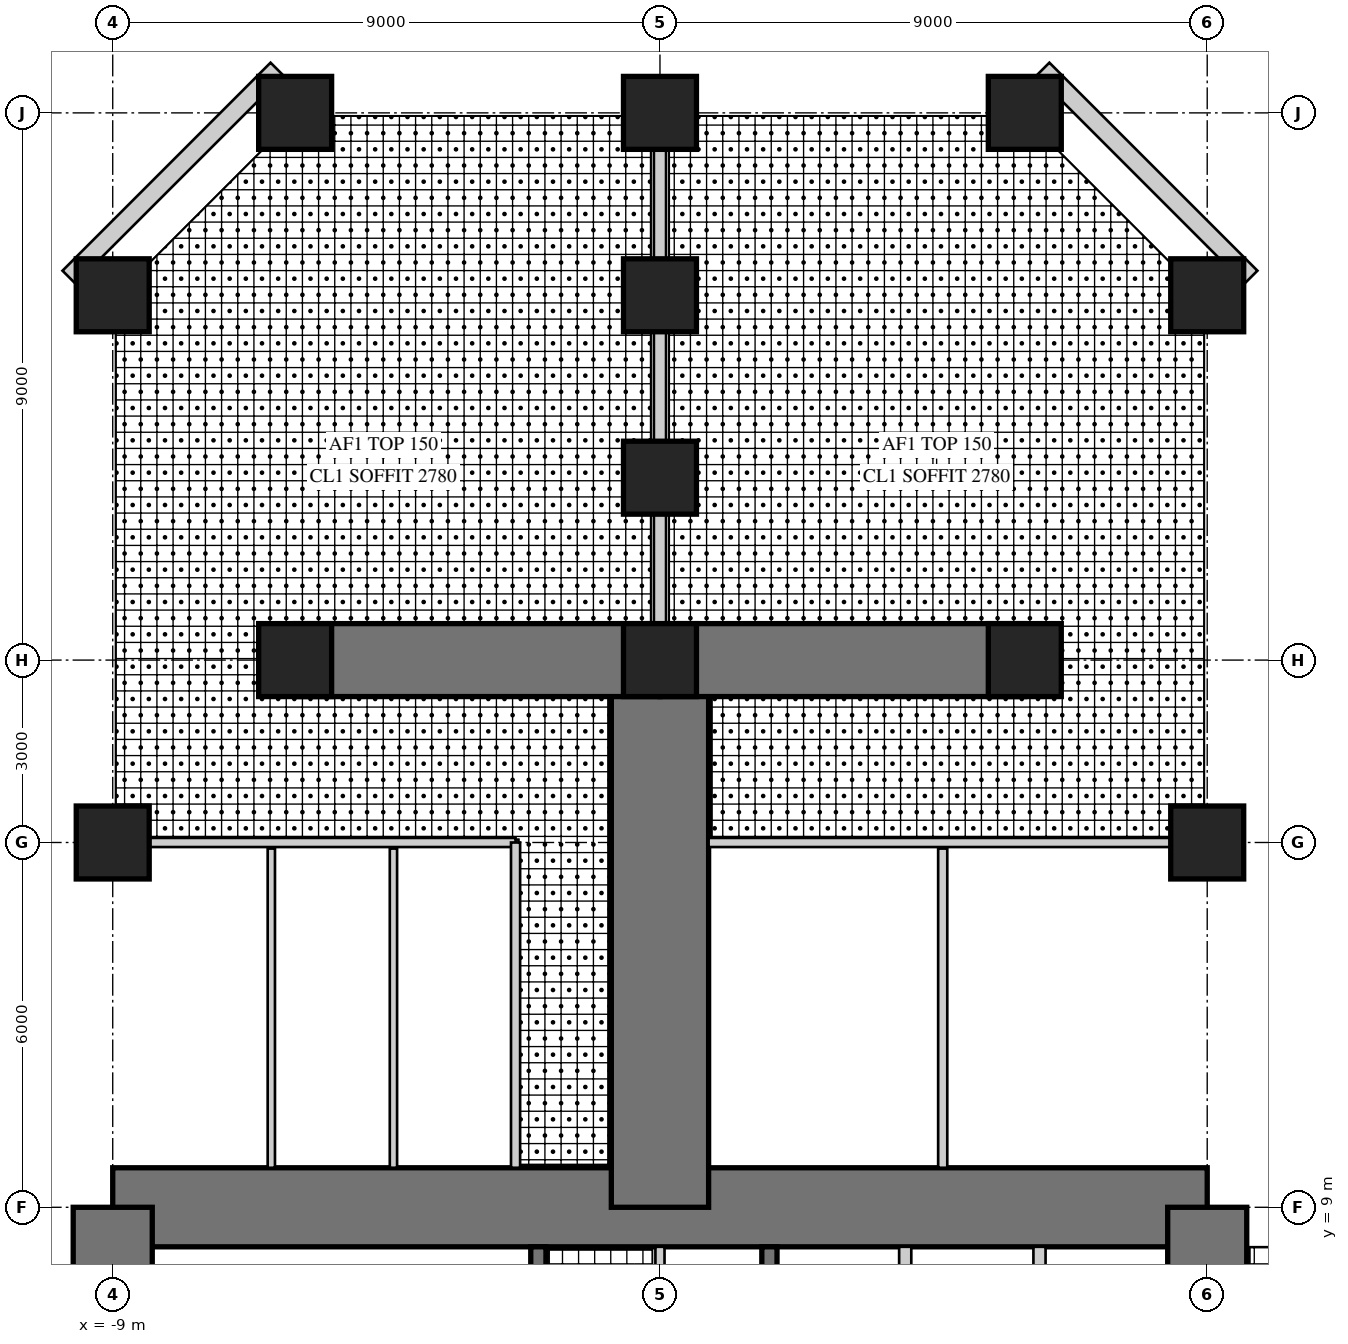
"""IFC4 building model, lengths in metres.
Left out: names, types, materials, properties, quantities, classifications, styles, units other than length and angle.
Written with IfcOpenShell. Run it as: python <this file> out.ifc"""

import sys

from ifc_helpers import new_model, si_unit, direction, frame, frame_2d, origin, origin_2d, place, context, subcontext, project, spatial, rectangle, hollow_rectangle, extrude, element, fill, save


model = new_model("IFC4")
c1 = context("Model", 3, precision=1e-05, world=origin(), true_north=direction((0.0, 1.0)))
c2 = subcontext(c1, "Body", "Model", "MODEL_VIEW")
j1 = project(units=[si_unit("LENGTHUNIT", "METRE"), si_unit("PLANEANGLEUNIT", "RADIAN")], contexts=[c1])
p1 = place(None, origin())
s1 = spatial("IfcSite", under=j1, at=p1, CompositionType="ELEMENT")
p2 = place(p1, origin())
s2 = spatial("IfcBuilding", under=s1, at=p2, CompositionType="ELEMENT")
p3 = place(p2, frame((0.0, 0.0, 27.5)))
s3 = spatial("IfcBuildingStorey", under=s2, at=p3, CompositionType="ELEMENT", Elevation=27.5)
p4 = place(p3, frame((9.0, 9.0, 0.0), z_axis=(0.0, 0.0, 1.0), x_axis=(-1.0, 0.0, 0.0)))
e1 = element("IfcWall", 1, at=p4, inside=s3, PredefinedType="SHEAR", context=c2, shape_type="SweptSolid", body=[
    extrude(rectangle(XDim=18.0, YDim=1.3, at=frame_2d((9.0, 0.0))), origin(), (0.0, 0.0, 1.0), 4.0),
])
p5 = place(p4, frame((9.8, 0.0, 0.0)))
e2 = element("IfcOpeningElement", 2, at=p5, cuts=e1, PredefinedType="OPENING", context=c2, shape_type="SweptSolid", body=[
    extrude(rectangle(XDim=1.0, YDim=2.4, at=frame_2d((0.5, 1.2))), frame((0.0, 0.66, 0.0), z_axis=(0.0, -1.0, 0.0), x_axis=(1.0, 0.0, 0.0)), (0.0, 0.0, 1.0), 1.32),
])
p6 = place(p3, frame((9.0, -9.0, 0.0), z_axis=(0.0, 0.0, 1.0), x_axis=(0.0, 1.0, 0.0)))
e3 = element("IfcWall", 3, at=p6, inside=s3, PredefinedType="SHEAR", context=c2, shape_type="SweptSolid", body=[
    extrude(rectangle(XDim=18.0, YDim=1.3, at=frame_2d((9.0, 0.0))), origin(), (0.0, 0.0, 1.0), 4.0),
])
p7 = place(p6, frame((9.8, 0.0, 0.0)))
e4 = element("IfcOpeningElement", 4, at=p7, cuts=e3, PredefinedType="OPENING", context=c2, shape_type="SweptSolid", body=[
    extrude(rectangle(XDim=1.0, YDim=2.4, at=frame_2d((0.5, 1.2))), frame((0.0, 0.66, 0.0), z_axis=(0.0, -1.0, 0.0), x_axis=(1.0, 0.0, 0.0)), (0.0, 0.0, 1.0), 1.32),
])
p8 = place(p3, frame((-9.0, 9.0, 0.0), z_axis=(0.0, 0.0, 1.0), x_axis=(0.0, -1.0, 0.0)))
e5 = element("IfcWall", 5, at=p8, inside=s3, PredefinedType="SHEAR", context=c2, shape_type="SweptSolid", body=[
    extrude(rectangle(XDim=18.0, YDim=1.3, at=frame_2d((9.0, 0.0))), origin(), (0.0, 0.0, 1.0), 4.0),
])
p9 = place(p8, frame((9.8, 0.0, 0.0)))
e6 = element("IfcOpeningElement", 6, at=p9, cuts=e5, PredefinedType="OPENING", context=c2, shape_type="SweptSolid", body=[
    extrude(rectangle(XDim=1.0, YDim=2.4, at=frame_2d((0.5, 1.2))), frame((0.0, 0.66, 0.0), z_axis=(0.0, -1.0, 0.0), x_axis=(1.0, 0.0, 0.0)), (0.0, 0.0, 1.0), 1.32),
])
p10 = place(p3, frame((1.8, 1.875, 0.0), z_axis=(0.0, 0.0, 1.0), x_axis=(0.0, 1.0, 0.0)))
e7 = element("IfcWall", 7, at=p10, inside=s3, PredefinedType="SHEAR", context=c2, shape_type="SweptSolid", body=[
    extrude(rectangle(XDim=6.475, YDim=0.25, at=frame_2d((3.238, 0.0))), origin(), (0.0, 0.0, 1.0), 4.0),
])
p11 = place(p10, frame((1.875, 0.0, 0.0)))
e8 = element("IfcOpeningElement", 8, at=p11, cuts=e7, PredefinedType="OPENING", context=c2, shape_type="SweptSolid", body=[
    extrude(rectangle(XDim=1.6, YDim=2.4, at=frame_2d((0.8, 1.2))), frame((0.0, 0.135, 0.0), z_axis=(0.0, -1.0, 0.0), x_axis=(1.0, 0.0, 0.0)), (0.0, 0.0, 1.0), 0.27),
])
for number, where, z_axis, x_axis in (
    (9, (4.033, 5.975, 0.0), (0.0, 0.0, 1.0), (0.0, 1.0, 0.0)),
    (10, (6.242, 5.975, 0.0), (0.0, 0.0, 1.0), (0.0, 1.0, 0.0)),
):
    element("IfcWall", number, at=place(p3, frame(where, z_axis=z_axis, x_axis=x_axis)), inside=s3, PredefinedType="PARTITIONING", context=c2, shape_type="SweptSolid", body=[
        extrude(rectangle(XDim=2.375, YDim=0.2, at=frame_2d((1.188, 0.0))), origin(), (0.0, 0.0, 1.0), 4.0),
    ])
p12 = place(p3, frame((-2.0, 1.675, 0.0), z_axis=(0.0, 0.0, 1.0), x_axis=(0.0, 1.0, 0.0)))
e11 = element("IfcWall", 11, at=p12, inside=s3, PredefinedType="SHEAR", context=c2, shape_type="SweptSolid", body=[
    extrude(rectangle(XDim=6.675, YDim=0.25, at=frame_2d((3.337, 0.0))), origin(), (0.0, 0.0, 1.0), 4.0),
])
p13 = place(p12, frame((0.725, 0.0, 0.0)))
e12 = element("IfcOpeningElement", 12, at=p13, cuts=e11, PredefinedType="OPENING", context=c2, shape_type="SweptSolid", body=[
    extrude(rectangle(XDim=1.0, YDim=2.1, at=frame_2d((0.5, 1.05))), frame((0.0, 0.135, 0.0), z_axis=(0.0, -1.0, 0.0), x_axis=(1.0, 0.0, 0.0)), (0.0, 0.0, 1.0), 0.27),
])
p14 = place(p3, frame((0.0, 9.0, 0.0), z_axis=(0.0, 0.0, 1.0), x_axis=(0.0, 1.0, 0.0)))
e13 = element("IfcWall", 13, at=p14, inside=s3, PredefinedType="SHEAR", context=c2, shape_type="SweptSolid", body=[
    extrude(rectangle(XDim=9.0, YDim=1.6, at=frame_2d((4.5, 0.0))), origin(), (0.0, 0.0, 1.0), 4.0),
])
for number, where, z_axis, x_axis in (
    (14, (0.0, 18.0, 0.0), (0.0, 0.0, 1.0), (-1.0, 0.0, 0.0)),
    (15, (0.0, 18.0, 0.0), (0.0, 0.0, 1.0), (1.0, 0.0, 0.0)),
):
    element("IfcWall", number, at=place(p3, frame(where, z_axis=z_axis, x_axis=x_axis)), inside=s3, PredefinedType="SHEAR", context=c2, shape_type="SweptSolid", body=[
        extrude(rectangle(XDim=6.0, YDim=1.2, at=frame_2d((3.0, 0.0))), origin(), (0.0, 0.0, 1.0), 4.0),
    ])
for number, where, z_axis, x_axis in (
    (16, (9.0, 15.0, 0.0), (0.0, 0.0, 1.0), (1.0, 0.0, 0.0)),
    (17, (9.0, 24.0, 0.0), (0.0, 0.0, 1.0), (1.0, 0.0, 0.0)),
    (18, (-9.0, 15.0, 0.0), (0.0, 0.0, 1.0), (1.0, 0.0, 0.0)),
    (19, (-9.0, 24.0, 0.0), (0.0, 0.0, 1.0), (1.0, 0.0, 0.0)),
    (20, (6.0, 27.0, 0.0), (0.0, 0.0, 1.0), (1.0, 0.0, 0.0)),
    (21, (0.0, 27.0, 0.0), (0.0, 0.0, 1.0), (1.0, 0.0, 0.0)),
    (22, (-6.0, 27.0, 0.0), (0.0, 0.0, 1.0), (1.0, 0.0, 0.0)),
    (23, (6.0, 18.0, 0.0), (0.0, 0.0, 1.0), (1.0, 0.0, 0.0)),
    (24, (0.0, 18.0, 0.0), (0.0, 0.0, 1.0), (1.0, 0.0, 0.0)),
    (25, (-6.0, 18.0, 0.0), (0.0, 0.0, 1.0), (1.0, 0.0, 0.0)),
    (26, (0.0, 21.0, 0.0), (0.0, 0.0, 1.0), (1.0, 0.0, 0.0)),
    (27, (0.0, 24.0, 0.0), (0.0, 0.0, 1.0), (1.0, 0.0, 0.0)),
):
    element("IfcColumn", number, at=place(p3, frame(where, z_axis=z_axis, x_axis=x_axis)), inside=s3, PredefinedType="COLUMN", context=c2, shape_type="SweptSolid", body=[
        extrude(rectangle(XDim=1.2, YDim=1.2, at=origin_2d()), origin(), (0.0, 0.0, 1.0), 4.0),
    ])
p15 = place(p3, frame((9.72, 24.298, 0.0), z_axis=(0.0, 0.0, 1.0), x_axis=(-0.707106781187, 0.707106781187, 0.0)))
e28 = element("IfcWall", 28, at=p15, inside=s3, PredefinedType="SOLIDWALL", context=c2, shape_type="SweptSolid", body=[
    extrude(rectangle(XDim=4.839, YDim=0.3, at=frame_2d((2.419, 0.0))), origin(), (0.0, 0.0, 1.0), 3.8),
])
p16 = place(p15, frame((1.969, 0.0, 0.3)))
e29 = element("IfcOpeningElement", 29, at=p16, cuts=e28, PredefinedType="OPENING", context=c2, shape_type="SweptSolid", body=[
    extrude(rectangle(XDim=0.9, YDim=2.4, at=frame_2d((0.45, 1.2))), frame((0.0, 0.16, 0.0), z_axis=(0.0, -1.0, 0.0), x_axis=(1.0, 0.0, 0.0)), (0.0, 0.0, 1.0), 0.32),
])
p17 = place(p3, frame((-6.298, 27.72, 0.0), z_axis=(0.0, 0.0, 1.0), x_axis=(-0.707106781187, -0.707106781187, 0.0)))
e30 = element("IfcWall", 30, at=p17, inside=s3, PredefinedType="SOLIDWALL", context=c2, shape_type="SweptSolid", body=[
    extrude(rectangle(XDim=4.839, YDim=0.3, at=frame_2d((2.419, 0.0))), origin(), (0.0, 0.0, 1.0), 3.8),
])
p18 = place(p17, frame((1.969, 0.0, 0.3)))
e31 = element("IfcOpeningElement", 31, at=p18, cuts=e30, PredefinedType="OPENING", context=c2, shape_type="SweptSolid", body=[
    extrude(rectangle(XDim=0.9, YDim=2.4, at=frame_2d((0.45, 1.2))), frame((0.0, 0.16, 0.0), z_axis=(0.0, -1.0, 0.0), x_axis=(1.0, 0.0, 0.0)), (0.0, 0.0, 1.0), 0.32),
])
p19 = place(p3, frame((0.0, 5.675, 0.0), z_axis=(0.0, 0.0, 1.0), x_axis=(0.0, 1.0, 0.0)))
e32 = element("IfcWall", 32, at=p19, inside=s3, PredefinedType="PARTITIONING", context=c2, shape_type="SweptSolid", body=[
    extrude(rectangle(XDim=2.675, YDim=0.15, at=frame_2d((1.337, 0.0))), origin(), (0.0, 0.0, 1.0), 3.8),
])
p20 = place(p19, frame((0.4, 0.0, 0.0)))
e33 = element("IfcOpeningElement", 33, at=p20, cuts=e32, PredefinedType="OPENING", context=c2, shape_type="SweptSolid", body=[
    extrude(rectangle(XDim=1.0, YDim=2.1, at=frame_2d((0.5, 1.05))), frame((0.0, 0.085, 0.0), z_axis=(0.0, -1.0, 0.0), x_axis=(1.0, 0.0, 0.0)), (0.0, 0.0, 1.0), 0.17),
])
p21 = place(p3, frame((-2.375, 15.0, 0.0), z_axis=(0.0, 0.0, 1.0), x_axis=(-1.0, 0.0, 0.0)))
e34 = element("IfcWall", 34, at=p21, inside=s3, PredefinedType="PARTITIONING", context=c2, shape_type="SweptSolid", body=[
    extrude(rectangle(XDim=6.025, YDim=0.15, at=frame_2d((3.012, 0.0))), origin(), (0.0, 0.0, 1.0), 2.95),
])
p22 = place(p21, frame((0.504, 0.0, 0.0)))
e35 = element("IfcOpeningElement", 35, at=p22, cuts=e34, PredefinedType="OPENING", context=c2, shape_type="SweptSolid", body=[
    extrude(rectangle(XDim=1.0, YDim=2.1, at=frame_2d((0.5, 1.05))), frame((0.0, 0.085, 0.0), z_axis=(0.0, -1.0, 0.0), x_axis=(1.0, 0.0, 0.0)), (0.0, 0.0, 1.0), 0.17),
])
p23 = place(p21, frame((2.512, 0.0, 0.0)))
e36 = element("IfcOpeningElement", 36, at=p23, cuts=e34, PredefinedType="OPENING", context=c2, shape_type="SweptSolid", body=[
    extrude(rectangle(XDim=1.0, YDim=2.1, at=frame_2d((0.5, 1.05))), frame((0.0, 0.085, 0.0), z_axis=(0.0, -1.0, 0.0), x_axis=(1.0, 0.0, 0.0)), (0.0, 0.0, 1.0), 0.17),
])
p24 = place(p21, frame((4.521, 0.0, 0.0)))
e37 = element("IfcOpeningElement", 37, at=p24, cuts=e34, PredefinedType="OPENING", context=c2, shape_type="SweptSolid", body=[
    extrude(rectangle(XDim=1.0, YDim=2.1, at=frame_2d((0.5, 1.05))), frame((0.0, 0.085, 0.0), z_axis=(0.0, -1.0, 0.0), x_axis=(1.0, 0.0, 0.0)), (0.0, 0.0, 1.0), 0.17),
])
p25 = place(p3, frame((-2.375, 9.65, 0.0), z_axis=(0.0, 0.0, 1.0), x_axis=(0.0, 1.0, 0.0)))
e38 = element("IfcWall", 38, at=p25, inside=s3, PredefinedType="PARTITIONING", context=c2, shape_type="SweptSolid", body=[
    extrude(rectangle(XDim=5.35, YDim=0.15, at=frame_2d((2.675, 0.0))), origin(), (0.0, 0.0, 1.0), 3.8),
])
for number, where, z_axis, x_axis in (
    (39, (-4.383, 9.65, 0.0), (0.0, 0.0, 1.0), (0.0, 1.0, 0.0)),
    (40, (-6.392, 9.65, 0.0), (0.0, 0.0, 1.0), (0.0, 1.0, 0.0)),
):
    element("IfcWall", number, at=place(p3, frame(where, z_axis=z_axis, x_axis=x_axis)), inside=s3, PredefinedType="PLUMBINGWALL", context=c2, shape_type="SweptSolid", body=[
        extrude(rectangle(XDim=5.25, YDim=0.12, at=frame_2d((2.625, 0.0))), origin(), (0.0, 0.0, 1.0), 3.8),
    ])
p26 = place(p3, frame((8.4, 15.0, 0.0), z_axis=(0.0, 0.0, 1.0), x_axis=(-1.0, 0.0, 0.0)))
e41 = element("IfcWall", 41, at=p26, inside=s3, PredefinedType="PARTITIONING", context=c2, shape_type="SweptSolid", body=[
    extrude(rectangle(XDim=7.6, YDim=0.15, at=frame_2d((3.8, 0.0))), origin(), (0.0, 0.0, 1.0), 2.95),
])
p27 = place(p26, frame((1.375, 0.0, 0.0)))
e42 = element("IfcOpeningElement", 42, at=p27, cuts=e41, PredefinedType="OPENING", context=c2, shape_type="SweptSolid", body=[
    extrude(rectangle(XDim=1.0, YDim=2.1, at=frame_2d((0.5, 1.05))), frame((0.0, 0.085, 0.0), z_axis=(0.0, -1.0, 0.0), x_axis=(1.0, 0.0, 0.0)), (0.0, 0.0, 1.0), 0.17),
])
p28 = place(p26, frame((5.175, 0.0, 0.0)))
e43 = element("IfcOpeningElement", 43, at=p28, cuts=e41, PredefinedType="OPENING", context=c2, shape_type="SweptSolid", body=[
    extrude(rectangle(XDim=1.0, YDim=2.1, at=frame_2d((0.5, 1.05))), frame((0.0, 0.085, 0.0), z_axis=(0.0, -1.0, 0.0), x_axis=(1.0, 0.0, 0.0)), (0.0, 0.0, 1.0), 0.17),
])
p29 = place(p3, frame((4.65, 9.65, 0.0), z_axis=(0.0, 0.0, 1.0), x_axis=(0.0, 1.0, 0.0)))
e44 = element("IfcWall", 44, at=p29, inside=s3, PredefinedType="PARTITIONING", context=c2, shape_type="SweptSolid", body=[
    extrude(rectangle(XDim=5.25, YDim=0.15, at=frame_2d((2.625, 0.0))), origin(), (0.0, 0.0, 1.0), 3.8),
])
p30 = place(p3, frame((0.0, 18.0, 0.0), z_axis=(0.0, 0.0, 1.0), x_axis=(0.0, 1.0, 0.0)))
e45 = element("IfcWall", 45, at=p30, inside=s3, PredefinedType="SOLIDWALL", context=c2, shape_type="SweptSolid", body=[
    extrude(rectangle(XDim=3.0, YDim=0.2, at=frame_2d((1.5, 0.0))), origin(), (0.0, 0.0, 1.0), 3.8),
])
p31 = place(p30, frame((0.9, 0.0, 0.0)))
e46 = element("IfcOpeningElement", 46, at=p31, cuts=e45, PredefinedType="OPENING", context=c2, shape_type="SweptSolid", body=[
    extrude(rectangle(XDim=1.0, YDim=2.2, at=frame_2d((0.5, 1.1))), frame((0.0, 0.11, 0.0), z_axis=(0.0, -1.0, 0.0), x_axis=(1.0, 0.0, 0.0)), (0.0, 0.0, 1.0), 0.22),
])
p32 = place(p3, frame((0.0, 21.0, 0.0), z_axis=(0.0, 0.0, 1.0), x_axis=(0.0, 1.0, 0.0)))
e47 = element("IfcWall", 47, at=p32, inside=s3, PredefinedType="SOLIDWALL", context=c2, shape_type="SweptSolid", body=[
    extrude(rectangle(XDim=6.0, YDim=0.2, at=frame_2d((3.0, 0.0))), origin(), (0.0, 0.0, 1.0), 2.9),
])
p33 = place(p16, origin())
e48 = element("IfcWindow", 48, at=p33, inside=s3, PartitioningType="SINGLE_PANEL", PredefinedType="WINDOW", context=c2, shape_type="SweptSolid", body=[
    extrude(hollow_rectangle(XDim=0.9, YDim=2.4, WallThickness=0.06, at=frame_2d((0.45, 1.2))), frame((0.0, 0.03, 0.0), z_axis=(0.0, -1.0, 0.0), x_axis=(1.0, 0.0, 0.0)), (0.0, 0.0, 1.0), 0.06),
    extrude(rectangle(XDim=0.779, YDim=2.279, at=frame_2d((0.45, 1.2))), frame((0.0, 0.03, 0.0), z_axis=(0.0, -1.0, 0.0), x_axis=(1.0, 0.0, 0.0)), (0.0, 0.0, 1.0), 0.06),
])
fill(e29, e48)
p34 = place(p18, origin())
e49 = element("IfcWindow", 49, at=p34, inside=s3, PartitioningType="SINGLE_PANEL", PredefinedType="WINDOW", context=c2, shape_type="SweptSolid", body=[
    extrude(hollow_rectangle(XDim=0.9, YDim=2.4, WallThickness=0.06, at=frame_2d((0.45, 1.2))), frame((0.0, 0.03, 0.0), z_axis=(0.0, -1.0, 0.0), x_axis=(1.0, 0.0, 0.0)), (0.0, 0.0, 1.0), 0.06),
    extrude(rectangle(XDim=0.779, YDim=2.279, at=frame_2d((0.45, 1.2))), frame((0.0, 0.03, 0.0), z_axis=(0.0, -1.0, 0.0), x_axis=(1.0, 0.0, 0.0)), (0.0, 0.0, 1.0), 0.06),
])
fill(e31, e49)
p35 = place(p22, origin())
e50 = element("IfcDoor", 50, at=p35, inside=s3, OperationType="SINGLE_SWING_LEFT", PredefinedType="DOOR", context=c2, shape_type="SweptSolid", body=[
    extrude(rectangle(XDim=1.0, YDim=2.1, at=frame_2d((0.5, 1.05))), frame((0.0, 0.025, 0.0), z_axis=(0.0, -1.0, 0.0), x_axis=(1.0, 0.0, 0.0)), (0.0, 0.0, 1.0), 0.05),
])
fill(e35, e50)
p36 = place(p23, origin())
e51 = element("IfcDoor", 51, at=p36, inside=s3, OperationType="SINGLE_SWING_LEFT", PredefinedType="DOOR", context=c2, shape_type="SweptSolid", body=[
    extrude(rectangle(XDim=1.0, YDim=2.1, at=frame_2d((0.5, 1.05))), frame((0.0, 0.025, 0.0), z_axis=(0.0, -1.0, 0.0), x_axis=(1.0, 0.0, 0.0)), (0.0, 0.0, 1.0), 0.05),
])
fill(e36, e51)
p37 = place(p24, origin())
e52 = element("IfcDoor", 52, at=p37, inside=s3, OperationType="SINGLE_SWING_LEFT", PredefinedType="DOOR", context=c2, shape_type="SweptSolid", body=[
    extrude(rectangle(XDim=1.0, YDim=2.1, at=frame_2d((0.5, 1.05))), frame((0.0, 0.025, 0.0), z_axis=(0.0, -1.0, 0.0), x_axis=(1.0, 0.0, 0.0)), (0.0, 0.0, 1.0), 0.05),
])
fill(e37, e52)
p38 = place(p27, origin())
e53 = element("IfcDoor", 53, at=p38, inside=s3, OperationType="SINGLE_SWING_RIGHT", PredefinedType="DOOR", context=c2, shape_type="SweptSolid", body=[
    extrude(rectangle(XDim=1.0, YDim=2.1, at=frame_2d((0.5, 1.05))), frame((0.0, 0.025, 0.0), z_axis=(0.0, -1.0, 0.0), x_axis=(1.0, 0.0, 0.0)), (0.0, 0.0, 1.0), 0.05),
])
fill(e42, e53)
p39 = place(p28, origin())
e54 = element("IfcDoor", 54, at=p39, inside=s3, OperationType="SINGLE_SWING_LEFT", PredefinedType="DOOR", context=c2, shape_type="SweptSolid", body=[
    extrude(rectangle(XDim=1.0, YDim=2.1, at=frame_2d((0.5, 1.05))), frame((0.0, 0.025, 0.0), z_axis=(0.0, -1.0, 0.0), x_axis=(1.0, 0.0, 0.0)), (0.0, 0.0, 1.0), 0.05),
])
fill(e43, e54)
p40 = place(p31, frame((1.0, 0.0, 0.0), z_axis=(0.0, 0.0, 1.0), x_axis=(-1.0, 0.0, 0.0)))
e55 = element("IfcDoor", 55, at=p40, inside=s3, OperationType="SINGLE_SWING_RIGHT", PredefinedType="DOOR", context=c2, shape_type="SweptSolid", body=[
    extrude(rectangle(XDim=1.0, YDim=2.2, at=frame_2d((0.5, 1.1))), frame((0.0, 0.025, 0.0), z_axis=(0.0, -1.0, 0.0), x_axis=(1.0, 0.0, 0.0)), (0.0, 0.0, 1.0), 0.05),
])
fill(e46, e55)
p41 = place(p5, frame((1.0, 0.0, 0.0), z_axis=(0.0, 0.0, 1.0), x_axis=(-1.0, 0.0, 0.0)))
e56 = element("IfcDoor", 56, at=p41, inside=s3, OperationType="SINGLE_SWING_RIGHT", PredefinedType="DOOR", context=c2, shape_type="SweptSolid", body=[
    extrude(rectangle(XDim=1.0, YDim=2.4, at=frame_2d((0.5, 1.2))), frame((0.0, -0.005, 0.0), z_axis=(0.0, -1.0, 0.0), x_axis=(1.0, 0.0, 0.0)), (0.0, 0.0, 1.0), 0.05),
])
fill(e2, e56)
save(model, sys.argv[1])
